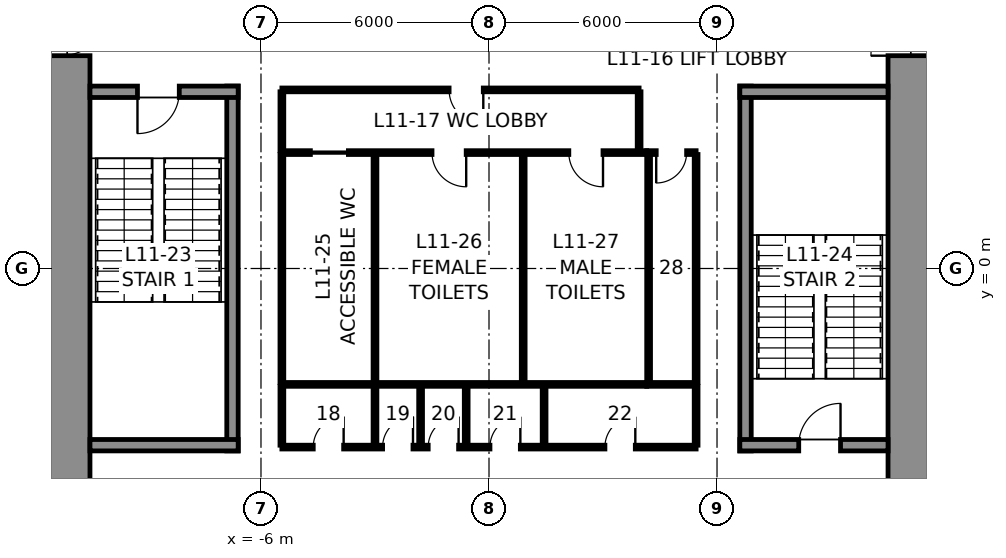
"""IFC4 building model, lengths in metres.
Left out: names, types, materials, properties, quantities, classifications, styles, units other than length and angle.
Written with IfcOpenShell. Run it as: python <this file> out.ifc"""

import sys

from ifc_helpers import new_model, si_unit, direction, frame, frame_2d, origin, place, context, subcontext, project, spatial, rectangle, extrude, element, fill, save


model = new_model("IFC4")
c1 = context("Model", 3, precision=1e-05, world=origin(), true_north=direction((0.0, 1.0)))
c2 = subcontext(c1, "Body", "Model", "MODEL_VIEW")
j1 = project(units=[si_unit("LENGTHUNIT", "METRE"), si_unit("PLANEANGLEUNIT", "RADIAN")], contexts=[c1])
p1 = place(None, origin())
s1 = spatial("IfcSite", under=j1, at=p1, CompositionType="ELEMENT")
p2 = place(p1, origin())
s2 = spatial("IfcBuilding", under=s1, at=p2, CompositionType="ELEMENT")
p3 = place(p2, frame((0.0, 0.0, 59.5)))
s3 = spatial("IfcBuildingStorey", under=s2, at=p3, CompositionType="ELEMENT", Elevation=59.5)
p4 = place(p3, frame((11.25, 10.5, 0.0), z_axis=(0.0, 0.0, 1.0), x_axis=(0.0, -1.0, 0.0)))
e1 = element("IfcWall", 1, at=p4, inside=s3, PredefinedType="SHEAR", context=c2, shape_type="SweptSolid", body=[
    extrude(rectangle(XDim=21.0, YDim=1.5, at=frame_2d((10.5, 0.0))), origin(), (0.0, 0.0, 1.0), 5.5),
])
p5 = place(p4, frame((3.7, 0.0, 0.0)))
e2 = element("IfcOpeningElement", 2, at=p5, cuts=e1, PredefinedType="OPENING", context=c2, shape_type="SweptSolid", body=[
    extrude(rectangle(XDim=1.2, YDim=2.3, at=frame_2d((0.6, 1.15))), frame((0.0, 0.76, 0.0), z_axis=(0.0, -1.0, 0.0), x_axis=(1.0, 0.0, 0.0)), (0.0, 0.0, 1.0), 1.52),
])
p6 = place(p4, frame((16.1, 0.0, 0.0)))
e3 = element("IfcOpeningElement", 3, at=p6, cuts=e1, PredefinedType="OPENING", context=c2, shape_type="SweptSolid", body=[
    extrude(rectangle(XDim=1.2, YDim=2.3, at=frame_2d((0.6, 1.15))), frame((0.0, 0.76, 0.0), z_axis=(0.0, -1.0, 0.0), x_axis=(1.0, 0.0, 0.0)), (0.0, 0.0, 1.0), 1.52),
])
p7 = place(p3, frame((-11.25, -10.5, 0.0), z_axis=(0.0, 0.0, 1.0), x_axis=(0.0, 1.0, 0.0)))
e4 = element("IfcWall", 4, at=p7, inside=s3, PredefinedType="SHEAR", context=c2, shape_type="SweptSolid", body=[
    extrude(rectangle(XDim=21.0, YDim=1.5, at=frame_2d((10.5, 0.0))), origin(), (0.0, 0.0, 1.0), 5.5),
])
p8 = place(p7, frame((16.1, 0.0, 0.0)))
e5 = element("IfcOpeningElement", 5, at=p8, cuts=e4, PredefinedType="OPENING", context=c2, shape_type="SweptSolid", body=[
    extrude(rectangle(XDim=1.2, YDim=2.3, at=frame_2d((0.6, 1.15))), frame((0.0, 0.76, 0.0), z_axis=(0.0, -1.0, 0.0), x_axis=(1.0, 0.0, 0.0)), (0.0, 0.0, 1.0), 1.52),
])
p9 = place(p7, frame((3.7, 0.0, 0.0)))
e6 = element("IfcOpeningElement", 6, at=p9, cuts=e4, PredefinedType="OPENING", context=c2, shape_type="SweptSolid", body=[
    extrude(rectangle(XDim=1.2, YDim=2.3, at=frame_2d((0.6, 1.15))), frame((0.0, 0.76, 0.0), z_axis=(0.0, -1.0, 0.0), x_axis=(1.0, 0.0, 0.0)), (0.0, 0.0, 1.0), 1.52),
])
p10 = place(p3, frame((-6.75, -4.8, 0.0), z_axis=(0.0, 0.0, 1.0), x_axis=(0.0, 1.0, 0.0)))
e7 = element("IfcWall", 7, at=p10, inside=s3, PredefinedType="SOLIDWALL", context=c2, shape_type="SweptSolid", body=[
    extrude(rectangle(XDim=9.6, YDim=0.3, at=frame_2d((4.8, 0.0))), origin(), (0.0, 0.0, 1.0), 5.25),
])
p11 = place(p3, frame((-10.5, 4.65, 0.0), z_axis=(0.0, 0.0, 1.0), x_axis=(1.0, 0.0, 0.0)))
e8 = element("IfcWall", 8, at=p11, inside=s3, PredefinedType="SOLIDWALL", context=c2, shape_type="SweptSolid", body=[
    extrude(rectangle(XDim=3.9, YDim=0.3, at=frame_2d((1.95, 0.0))), origin(), (0.0, 0.0, 1.0), 5.25),
])
p12 = place(p11, frame((1.25, 0.0, 0.0)))
e9 = element("IfcOpeningElement", 9, at=p12, cuts=e8, PredefinedType="OPENING", context=c2, shape_type="SweptSolid", body=[
    extrude(rectangle(XDim=1.1, YDim=2.3, at=frame_2d((0.55, 1.15))), frame((0.0, 0.16, 0.0), z_axis=(0.0, -1.0, 0.0), x_axis=(1.0, 0.0, 0.0)), (0.0, 0.0, 1.0), 0.32),
])
p13 = place(p3, frame((-6.6, -4.65, 0.0), z_axis=(0.0, 0.0, 1.0), x_axis=(-1.0, 0.0, 0.0)))
e10 = element("IfcWall", 10, at=p13, inside=s3, PredefinedType="SOLIDWALL", context=c2, shape_type="SweptSolid", body=[
    extrude(rectangle(XDim=3.9, YDim=0.3, at=frame_2d((1.95, 0.0))), origin(), (0.0, 0.0, 1.0), 5.25),
])
p14 = place(p3, frame((6.75, -4.8, 0.0), z_axis=(0.0, 0.0, 1.0), x_axis=(0.0, 1.0, 0.0)))
e11 = element("IfcWall", 11, at=p14, inside=s3, PredefinedType="SOLIDWALL", context=c2, shape_type="SweptSolid", body=[
    extrude(rectangle(XDim=9.6, YDim=0.3, at=frame_2d((4.8, 0.0))), origin(), (0.0, 0.0, 1.0), 5.25),
])
p15 = place(p3, frame((6.6, 4.65, 0.0), z_axis=(0.0, 0.0, 1.0), x_axis=(1.0, 0.0, 0.0)))
e12 = element("IfcWall", 12, at=p15, inside=s3, PredefinedType="SOLIDWALL", context=c2, shape_type="SweptSolid", body=[
    extrude(rectangle(XDim=3.9, YDim=0.3, at=frame_2d((1.95, 0.0))), origin(), (0.0, 0.0, 1.0), 5.25),
])
p16 = place(p3, frame((10.5, -4.65, 0.0), z_axis=(0.0, 0.0, 1.0), x_axis=(-1.0, 0.0, 0.0)))
e13 = element("IfcWall", 13, at=p16, inside=s3, PredefinedType="SOLIDWALL", context=c2, shape_type="SweptSolid", body=[
    extrude(rectangle(XDim=3.9, YDim=0.3, at=frame_2d((1.95, 0.0))), origin(), (0.0, 0.0, 1.0), 5.25),
])
p17 = place(p16, frame((1.25, 0.0, 0.0)))
e14 = element("IfcOpeningElement", 14, at=p17, cuts=e13, PredefinedType="OPENING", context=c2, shape_type="SweptSolid", body=[
    extrude(rectangle(XDim=1.1, YDim=2.3, at=frame_2d((0.55, 1.15))), frame((0.0, 0.16, 0.0), z_axis=(0.0, -1.0, 0.0), x_axis=(1.0, 0.0, 0.0)), (0.0, 0.0, 1.0), 0.32),
])
p18 = place(p3, frame((-5.45, 3.05, 0.0), z_axis=(0.0, 0.0, 1.0), x_axis=(1.0, 0.0, 0.0)))
e15 = element("IfcWall", 15, at=p18, inside=s3, PredefinedType="PARTITIONING", context=c2, shape_type="SweptSolid", body=[
    extrude(rectangle(XDim=9.6, YDim=0.1, at=frame_2d((4.8, 0.0))), origin(), (0.0, 0.0, 1.0), 5.25),
])
p19 = place(p18, frame((0.75, 0.0, 0.0)))
e16 = element("IfcOpeningElement", 16, at=p19, cuts=e15, PredefinedType="OPENING", context=c2, shape_type="SweptSolid", body=[
    extrude(rectangle(XDim=1.0, YDim=2.3, at=frame_2d((0.5, 1.15))), frame((0.0, 0.06, 0.0), z_axis=(0.0, -1.0, 0.0), x_axis=(1.0, 0.0, 0.0)), (0.0, 0.0, 1.0), 0.12),
])
p20 = place(p18, frame((3.95, 0.0, 0.0)))
e17 = element("IfcOpeningElement", 17, at=p20, cuts=e15, PredefinedType="OPENING", context=c2, shape_type="SweptSolid", body=[
    extrude(rectangle(XDim=0.9, YDim=2.3, at=frame_2d((0.45, 1.15))), frame((0.0, 0.06, 0.0), z_axis=(0.0, -1.0, 0.0), x_axis=(1.0, 0.0, 0.0)), (0.0, 0.0, 1.0), 0.12),
])
p21 = place(p18, frame((7.55, 0.0, 0.0)))
e18 = element("IfcOpeningElement", 18, at=p21, cuts=e15, PredefinedType="OPENING", context=c2, shape_type="SweptSolid", body=[
    extrude(rectangle(XDim=0.9, YDim=2.3, at=frame_2d((0.45, 1.15))), frame((0.0, 0.06, 0.0), z_axis=(0.0, -1.0, 0.0), x_axis=(1.0, 0.0, 0.0)), (0.0, 0.0, 1.0), 0.12),
])
p22 = place(p3, frame((4.15, 3.05, 0.0), z_axis=(0.0, 0.0, 1.0), x_axis=(1.0, 0.0, 0.0)))
e19 = element("IfcWall", 19, at=p22, inside=s3, PredefinedType="PARTITIONING", context=c2, shape_type="SweptSolid", body=[
    extrude(rectangle(XDim=1.3, YDim=0.1, at=frame_2d((0.65, 0.0))), origin(), (0.0, 0.0, 1.0), 5.25),
])
p23 = place(p22, frame((0.25, 0.0, 0.0)))
e20 = element("IfcOpeningElement", 20, at=p23, cuts=e19, PredefinedType="OPENING", context=c2, shape_type="SweptSolid", body=[
    extrude(rectangle(XDim=0.8, YDim=2.3, at=frame_2d((0.4, 1.15))), frame((0.0, 0.06, 0.0), z_axis=(0.0, -1.0, 0.0), x_axis=(1.0, 0.0, 0.0)), (0.0, 0.0, 1.0), 0.12),
])
p24 = place(p3, frame((4.15, -3.05, 0.0), z_axis=(0.0, 0.0, 1.0), x_axis=(-1.0, 0.0, 0.0)))
e21 = element("IfcWall", 21, at=p24, inside=s3, PredefinedType="PARTITIONING", context=c2, shape_type="SweptSolid", body=[
    extrude(rectangle(XDim=9.6, YDim=0.1, at=frame_2d((4.8, 0.0))), origin(), (0.0, 0.0, 1.0), 5.25),
])
p25 = place(p3, frame((5.45, -3.05, 0.0), z_axis=(0.0, 0.0, 1.0), x_axis=(-1.0, 0.0, 0.0)))
e22 = element("IfcWall", 22, at=p25, inside=s3, PredefinedType="PARTITIONING", context=c2, shape_type="SweptSolid", body=[
    extrude(rectangle(XDim=1.3, YDim=0.1, at=frame_2d((0.65, 0.0))), origin(), (0.0, 0.0, 1.0), 5.25),
])
for number, where, z_axis, x_axis in (
    (23, (5.45, 3.0, 0.0), (0.0, 0.0, 1.0), (0.0, -1.0, 0.0)),
    (24, (-5.45, -3.0, 0.0), (0.0, 0.0, 1.0), (0.0, 1.0, 0.0)),
    (25, (-3.0, -3.0, 0.0), (0.0, 0.0, 1.0), (0.0, 1.0, 0.0)),
    (26, (0.9, -3.0, 0.0), (0.0, 0.0, 1.0), (0.0, 1.0, 0.0)),
    (27, (4.2, -3.0, 0.0), (0.0, 0.0, 1.0), (0.0, 1.0, 0.0)),
):
    element("IfcWall", number, at=place(p3, frame(where, z_axis=z_axis, x_axis=x_axis)), inside=s3, PredefinedType="PARTITIONING", context=c2, shape_type="SweptSolid", body=[
        extrude(rectangle(XDim=6.0, YDim=0.1, at=frame_2d((3.0, 0.0))), origin(), (0.0, 0.0, 1.0), 5.25),
    ])
p26 = place(p3, frame((-5.45, 4.7, 0.0), z_axis=(0.0, 0.0, 1.0), x_axis=(1.0, 0.0, 0.0)))
e28 = element("IfcWall", 28, at=p26, inside=s3, PredefinedType="PARTITIONING", context=c2, shape_type="SweptSolid", body=[
    extrude(rectangle(XDim=9.4, YDim=0.1, at=frame_2d((4.7, 0.0))), origin(), (0.0, 0.0, 1.0), 5.25),
])
p27 = place(p26, frame((4.4, 0.0, 0.0)))
e29 = element("IfcOpeningElement", 29, at=p27, cuts=e28, PredefinedType="OPENING", context=c2, shape_type="SweptSolid", body=[
    extrude(rectangle(XDim=0.9, YDim=2.3, at=frame_2d((0.45, 1.15))), frame((0.0, 0.06, 0.0), z_axis=(0.0, -1.0, 0.0), x_axis=(1.0, 0.0, 0.0)), (0.0, 0.0, 1.0), 0.12),
])
for number, where, z_axis, x_axis in (
    (30, (-5.45, 3.1, 0.0), (0.0, 0.0, 1.0), (0.0, 1.0, 0.0)),
    (31, (3.95, 3.1, 0.0), (0.0, 0.0, 1.0), (0.0, 1.0, 0.0)),
):
    element("IfcWall", number, at=place(p3, frame(where, z_axis=z_axis, x_axis=x_axis)), inside=s3, PredefinedType="PARTITIONING", context=c2, shape_type="SweptSolid", body=[
        extrude(rectangle(XDim=1.55, YDim=0.1, at=frame_2d((0.775, 0.0))), origin(), (0.0, 0.0, 1.0), 5.25),
    ])
p28 = place(p3, frame((5.45, -4.7, 0.0), z_axis=(0.0, 0.0, 1.0), x_axis=(-1.0, 0.0, 0.0)))
e32 = element("IfcWall", 32, at=p28, inside=s3, PredefinedType="PARTITIONING", context=c2, shape_type="SweptSolid", body=[
    extrude(rectangle(XDim=10.9, YDim=0.1, at=frame_2d((5.45, 0.0))), origin(), (0.0, 0.0, 1.0), 5.25),
])
p29 = place(p28, frame((9.275, 0.0, 0.0)))
e33 = element("IfcOpeningElement", 33, at=p29, cuts=e32, PredefinedType="OPENING", context=c2, shape_type="SweptSolid", body=[
    extrude(rectangle(XDim=0.8, YDim=2.3, at=frame_2d((0.4, 1.15))), frame((0.0, 0.06, 0.0), z_axis=(0.0, -1.0, 0.0), x_axis=(1.0, 0.0, 0.0)), (0.0, 0.0, 1.0), 0.12),
])
p30 = place(p28, frame((7.45, 0.0, 0.0)))
e34 = element("IfcOpeningElement", 34, at=p30, cuts=e32, PredefinedType="OPENING", context=c2, shape_type="SweptSolid", body=[
    extrude(rectangle(XDim=0.8, YDim=2.3, at=frame_2d((0.4, 1.15))), frame((0.0, 0.06, 0.0), z_axis=(0.0, -1.0, 0.0), x_axis=(1.0, 0.0, 0.0)), (0.0, 0.0, 1.0), 0.12),
])
p31 = place(p28, frame((6.25, 0.0, 0.0)))
e35 = element("IfcOpeningElement", 35, at=p31, cuts=e32, PredefinedType="OPENING", context=c2, shape_type="SweptSolid", body=[
    extrude(rectangle(XDim=0.8, YDim=2.3, at=frame_2d((0.4, 1.15))), frame((0.0, 0.06, 0.0), z_axis=(0.0, -1.0, 0.0), x_axis=(1.0, 0.0, 0.0)), (0.0, 0.0, 1.0), 0.12),
])
p32 = place(p28, frame((4.625, 0.0, 0.0)))
e36 = element("IfcOpeningElement", 36, at=p32, cuts=e32, PredefinedType="OPENING", context=c2, shape_type="SweptSolid", body=[
    extrude(rectangle(XDim=0.8, YDim=2.3, at=frame_2d((0.4, 1.15))), frame((0.0, 0.06, 0.0), z_axis=(0.0, -1.0, 0.0), x_axis=(1.0, 0.0, 0.0)), (0.0, 0.0, 1.0), 0.12),
])
p33 = place(p28, frame((1.6, 0.0, 0.0)))
e37 = element("IfcOpeningElement", 37, at=p33, cuts=e32, PredefinedType="OPENING", context=c2, shape_type="SweptSolid", body=[
    extrude(rectangle(XDim=0.8, YDim=2.3, at=frame_2d((0.4, 1.15))), frame((0.0, 0.06, 0.0), z_axis=(0.0, -1.0, 0.0), x_axis=(1.0, 0.0, 0.0)), (0.0, 0.0, 1.0), 0.12),
])
for number, where, z_axis, x_axis in (
    (38, (-5.45, -3.1, 0.0), (0.0, 0.0, 1.0), (0.0, -1.0, 0.0)),
    (39, (5.45, -3.1, 0.0), (0.0, 0.0, 1.0), (0.0, -1.0, 0.0)),
    (40, (-3.0, -3.1, 0.0), (0.0, 0.0, 1.0), (0.0, -1.0, 0.0)),
    (41, (-1.8, -3.1, 0.0), (0.0, 0.0, 1.0), (0.0, -1.0, 0.0)),
    (42, (-0.6, -3.1, 0.0), (0.0, 0.0, 1.0), (0.0, -1.0, 0.0)),
    (43, (1.45, -3.1, 0.0), (0.0, 0.0, 1.0), (0.0, -1.0, 0.0)),
):
    element("IfcWall", number, at=place(p3, frame(where, z_axis=z_axis, x_axis=x_axis)), inside=s3, PredefinedType="PARTITIONING", context=c2, shape_type="SweptSolid", body=[
        extrude(rectangle(XDim=1.55, YDim=0.1, at=frame_2d((0.775, 0.0))), origin(), (0.0, 0.0, 1.0), 5.25),
    ])
p34 = place(p12, frame((1.1, 0.0, 0.0), z_axis=(0.0, 0.0, 1.0), x_axis=(-1.0, 0.0, 0.0)))
e44 = element("IfcDoor", 44, at=p34, inside=s3, OperationType="SINGLE_SWING_RIGHT", PredefinedType="DOOR", context=c2, shape_type="SweptSolid", body=[
    extrude(rectangle(XDim=1.1, YDim=2.3, at=frame_2d((0.55, 1.15))), frame((0.0, 0.025, 0.0), z_axis=(0.0, -1.0, 0.0), x_axis=(1.0, 0.0, 0.0)), (0.0, 0.0, 1.0), 0.05),
])
fill(e9, e44)
p35 = place(p17, frame((1.1, 0.0, 0.0), z_axis=(0.0, 0.0, 1.0), x_axis=(-1.0, 0.0, 0.0)))
e45 = element("IfcDoor", 45, at=p35, inside=s3, OperationType="SINGLE_SWING_RIGHT", PredefinedType="DOOR", context=c2, shape_type="SweptSolid", body=[
    extrude(rectangle(XDim=1.1, YDim=2.3, at=frame_2d((0.55, 1.15))), frame((0.0, 0.025, 0.0), z_axis=(0.0, -1.0, 0.0), x_axis=(1.0, 0.0, 0.0)), (0.0, 0.0, 1.0), 0.05),
])
fill(e14, e45)
p36 = place(p19, frame((1.0, 0.0, 0.0), z_axis=(0.0, 0.0, 1.0), x_axis=(-1.0, 0.0, 0.0)))
e46 = element("IfcDoor", 46, at=p36, inside=s3, OperationType="SLIDING_TO_LEFT", PredefinedType="DOOR", context=c2, shape_type="SweptSolid", body=[
    extrude(rectangle(XDim=1.0, YDim=2.3, at=frame_2d((0.5, 1.15))), frame((0.0, 0.025, 0.0), z_axis=(0.0, -1.0, 0.0), x_axis=(1.0, 0.0, 0.0)), (0.0, 0.0, 1.0), 0.05),
])
fill(e16, e46)
p37 = place(p20, frame((0.9, 0.0, 0.0), z_axis=(0.0, 0.0, 1.0), x_axis=(-1.0, 0.0, 0.0)))
e47 = element("IfcDoor", 47, at=p37, inside=s3, OperationType="SINGLE_SWING_LEFT", PredefinedType="DOOR", context=c2, shape_type="SweptSolid", body=[
    extrude(rectangle(XDim=0.9, YDim=2.3, at=frame_2d((0.45, 1.15))), frame((0.0, 0.025, 0.0), z_axis=(0.0, -1.0, 0.0), x_axis=(1.0, 0.0, 0.0)), (0.0, 0.0, 1.0), 0.05),
])
fill(e17, e47)
p38 = place(p21, frame((0.9, 0.0, 0.0), z_axis=(0.0, 0.0, 1.0), x_axis=(-1.0, 0.0, 0.0)))
e48 = element("IfcDoor", 48, at=p38, inside=s3, OperationType="SINGLE_SWING_LEFT", PredefinedType="DOOR", context=c2, shape_type="SweptSolid", body=[
    extrude(rectangle(XDim=0.9, YDim=2.3, at=frame_2d((0.45, 1.15))), frame((0.0, 0.025, 0.0), z_axis=(0.0, -1.0, 0.0), x_axis=(1.0, 0.0, 0.0)), (0.0, 0.0, 1.0), 0.05),
])
fill(e18, e48)
p39 = place(p23, frame((0.8, 0.0, 0.0), z_axis=(0.0, 0.0, 1.0), x_axis=(-1.0, 0.0, 0.0)))
e49 = element("IfcDoor", 49, at=p39, inside=s3, OperationType="SINGLE_SWING_RIGHT", PredefinedType="DOOR", context=c2, shape_type="SweptSolid", body=[
    extrude(rectangle(XDim=0.8, YDim=2.3, at=frame_2d((0.4, 1.15))), frame((0.0, 0.025, 0.0), z_axis=(0.0, -1.0, 0.0), x_axis=(1.0, 0.0, 0.0)), (0.0, 0.0, 1.0), 0.05),
])
fill(e20, e49)
p40 = place(p27, frame((0.9, 0.0, 0.0), z_axis=(0.0, 0.0, 1.0), x_axis=(-1.0, 0.0, 0.0)))
e50 = element("IfcDoor", 50, at=p40, inside=s3, OperationType="SINGLE_SWING_LEFT", PredefinedType="DOOR", context=c2, shape_type="SweptSolid", body=[
    extrude(rectangle(XDim=0.9, YDim=2.3, at=frame_2d((0.45, 1.15))), frame((0.0, 0.025, 0.0), z_axis=(0.0, -1.0, 0.0), x_axis=(1.0, 0.0, 0.0)), (0.0, 0.0, 1.0), 0.05),
])
fill(e29, e50)
p41 = place(p29, frame((0.8, 0.0, 0.0), z_axis=(0.0, 0.0, 1.0), x_axis=(-1.0, 0.0, 0.0)))
e51 = element("IfcDoor", 51, at=p41, inside=s3, OperationType="SINGLE_SWING_RIGHT", PredefinedType="DOOR", context=c2, shape_type="SweptSolid", body=[
    extrude(rectangle(XDim=0.8, YDim=2.3, at=frame_2d((0.4, 1.15))), frame((0.0, 0.025, 0.0), z_axis=(0.0, -1.0, 0.0), x_axis=(1.0, 0.0, 0.0)), (0.0, 0.0, 1.0), 0.05),
])
fill(e33, e51)
p42 = place(p30, frame((0.8, 0.0, 0.0), z_axis=(0.0, 0.0, 1.0), x_axis=(-1.0, 0.0, 0.0)))
e52 = element("IfcDoor", 52, at=p42, inside=s3, OperationType="SINGLE_SWING_RIGHT", PredefinedType="DOOR", context=c2, shape_type="SweptSolid", body=[
    extrude(rectangle(XDim=0.8, YDim=2.3, at=frame_2d((0.4, 1.15))), frame((0.0, 0.025, 0.0), z_axis=(0.0, -1.0, 0.0), x_axis=(1.0, 0.0, 0.0)), (0.0, 0.0, 1.0), 0.05),
])
fill(e34, e52)
p43 = place(p31, frame((0.8, 0.0, 0.0), z_axis=(0.0, 0.0, 1.0), x_axis=(-1.0, 0.0, 0.0)))
e53 = element("IfcDoor", 53, at=p43, inside=s3, OperationType="SINGLE_SWING_RIGHT", PredefinedType="DOOR", context=c2, shape_type="SweptSolid", body=[
    extrude(rectangle(XDim=0.8, YDim=2.3, at=frame_2d((0.4, 1.15))), frame((0.0, 0.025, 0.0), z_axis=(0.0, -1.0, 0.0), x_axis=(1.0, 0.0, 0.0)), (0.0, 0.0, 1.0), 0.05),
])
fill(e35, e53)
p44 = place(p32, frame((0.8, 0.0, 0.0), z_axis=(0.0, 0.0, 1.0), x_axis=(-1.0, 0.0, 0.0)))
e54 = element("IfcDoor", 54, at=p44, inside=s3, OperationType="SINGLE_SWING_RIGHT", PredefinedType="DOOR", context=c2, shape_type="SweptSolid", body=[
    extrude(rectangle(XDim=0.8, YDim=2.3, at=frame_2d((0.4, 1.15))), frame((0.0, 0.025, 0.0), z_axis=(0.0, -1.0, 0.0), x_axis=(1.0, 0.0, 0.0)), (0.0, 0.0, 1.0), 0.05),
])
fill(e36, e54)
p45 = place(p33, frame((0.8, 0.0, 0.0), z_axis=(0.0, 0.0, 1.0), x_axis=(-1.0, 0.0, 0.0)))
e55 = element("IfcDoor", 55, at=p45, inside=s3, OperationType="SINGLE_SWING_RIGHT", PredefinedType="DOOR", context=c2, shape_type="SweptSolid", body=[
    extrude(rectangle(XDim=0.8, YDim=2.3, at=frame_2d((0.4, 1.15))), frame((0.0, 0.025, 0.0), z_axis=(0.0, -1.0, 0.0), x_axis=(1.0, 0.0, 0.0)), (0.0, 0.0, 1.0), 0.05),
])
fill(e37, e55)
p46 = place(p8, frame((1.2, 0.0, 0.0), z_axis=(0.0, 0.0, 1.0), x_axis=(-1.0, 0.0, 0.0)))
e56 = element("IfcDoor", 56, at=p46, inside=s3, OperationType="SINGLE_SWING_LEFT", PredefinedType="DOOR", context=c2, shape_type="SweptSolid", body=[
    extrude(rectangle(XDim=1.2, YDim=2.3, at=frame_2d((0.6, 1.15))), frame((0.0, 0.025, 0.0), z_axis=(0.0, -1.0, 0.0), x_axis=(1.0, 0.0, 0.0)), (0.0, 0.0, 1.0), 0.05),
])
fill(e5, e56)
p47 = place(p5, frame((1.2, 0.0, 0.0), z_axis=(0.0, 0.0, 1.0), x_axis=(-1.0, 0.0, 0.0)))
e57 = element("IfcDoor", 57, at=p47, inside=s3, OperationType="SINGLE_SWING_LEFT", PredefinedType="DOOR", context=c2, shape_type="SweptSolid", body=[
    extrude(rectangle(XDim=1.2, YDim=2.3, at=frame_2d((0.6, 1.15))), frame((0.0, 0.025, 0.0), z_axis=(0.0, -1.0, 0.0), x_axis=(1.0, 0.0, 0.0)), (0.0, 0.0, 1.0), 0.05),
])
fill(e2, e57)
save(model, sys.argv[1])
